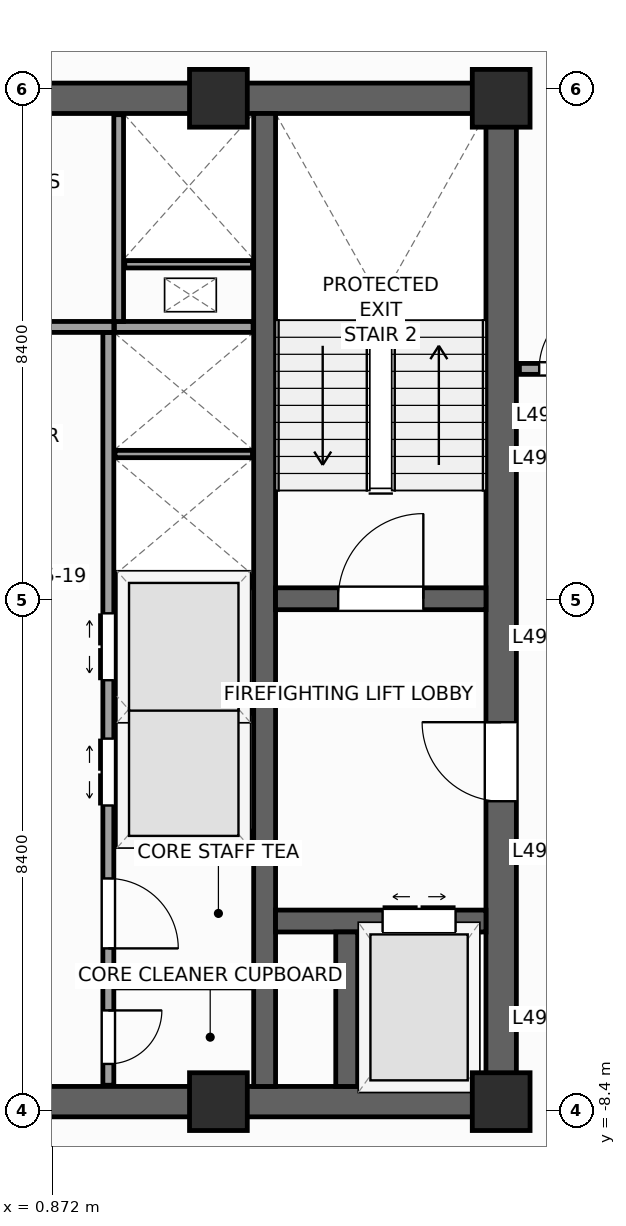
"""IFC4 building model, lengths in metres.
Left out: names, types, materials, properties, quantities, classifications, styles, units other than length and angle.
Written with IfcOpenShell. Run it as: python <this file> out.ifc"""

import sys

from ifc_helpers import new_model, si_unit, direction, frame, frame_2d, origin, origin_2d, place, context, subcontext, project, spatial, rectangle, extrude, source, transform, mapped, element, fill, save


model = new_model("IFC4")
c1 = context("Model", 3, precision=1e-05, world=origin(), true_north=direction((0.0, 1.0)))
c2 = subcontext(c1, "Body", "Model", "MODEL_VIEW")
j1 = project(units=[si_unit("LENGTHUNIT", "METRE"), si_unit("PLANEANGLEUNIT", "RADIAN")], contexts=[c1])
p1 = place(None, origin())
s1 = spatial("IfcSite", under=j1, at=p1, CompositionType="ELEMENT")
p2 = place(p1, origin())
s2 = spatial("IfcBuilding", under=s1, at=p2, CompositionType="ELEMENT")
p3 = place(p2, frame((0.0, 0.0, 205.6)))
s3 = spatial("IfcBuildingStorey", under=s2, at=p3, CompositionType="ELEMENT", Elevation=205.6)
p4 = place(p3, frame((-8.5, -8.25, 0.0), z_axis=(0.0, 0.0, 1.0), x_axis=(1.0, 0.0, 0.0)))
e1 = element("IfcWall", 1, at=p4, inside=s3, PredefinedType="SHEAR", context=c2, shape_type="SweptSolid", body=[
    extrude(rectangle(XDim=17.0, YDim=0.5, at=frame_2d((8.5, 0.0))), origin(), (0.0, 0.0, 1.0), 3.9),
])
p5 = place(p4, frame((7.85, 0.0, 0.0)))
e2 = element("IfcOpeningElement", 2, at=p5, cuts=e1, PredefinedType="OPENING", context=c2, shape_type="SweptSolid", body=[
    extrude(rectangle(XDim=1.3, YDim=2.2, at=frame_2d((0.65, 1.1))), frame((0.0, 0.26, 0.0), z_axis=(0.0, -1.0, 0.0), x_axis=(1.0, 0.0, 0.0)), (0.0, 0.0, 1.0), 0.52),
])
p6 = place(p3, frame((-8.5, 8.25, 0.0), z_axis=(0.0, 0.0, 1.0), x_axis=(1.0, 0.0, 0.0)))
e3 = element("IfcWall", 3, at=p6, inside=s3, PredefinedType="SHEAR", context=c2, shape_type="SweptSolid", body=[
    extrude(rectangle(XDim=17.0, YDim=0.5, at=frame_2d((8.5, 0.0))), origin(), (0.0, 0.0, 1.0), 3.9),
])
p7 = place(p3, frame((8.25, -8.0, 0.0), z_axis=(0.0, 0.0, 1.0), x_axis=(0.0, 1.0, 0.0)))
e4 = element("IfcWall", 4, at=p7, inside=s3, PredefinedType="SHEAR", context=c2, shape_type="SweptSolid", body=[
    extrude(rectangle(XDim=16.0, YDim=0.5, at=frame_2d((8.0, 0.0))), origin(), (0.0, 0.0, 1.0), 3.9),
])
p8 = place(p7, frame((4.69, 0.0, 0.0)))
e5 = element("IfcOpeningElement", 5, at=p8, cuts=e4, PredefinedType="OPENING", context=c2, shape_type="SweptSolid", body=[
    extrude(rectangle(XDim=1.3, YDim=2.2, at=frame_2d((0.65, 1.1))), frame((0.0, 0.26, 0.0), z_axis=(0.0, -1.0, 0.0), x_axis=(1.0, 0.0, 0.0)), (0.0, 0.0, 1.0), 0.52),
])
p9 = place(p3, frame((4.36, -8.0, 0.0), z_axis=(0.0, 0.0, 1.0), x_axis=(0.0, 1.0, 0.0)))
e6 = element("IfcWall", 6, at=p9, inside=s3, PredefinedType="SHEAR", context=c2, shape_type="SweptSolid", body=[
    extrude(rectangle(XDim=16.0, YDim=0.36, at=frame_2d((8.0, 0.0))), origin(), (0.0, 0.0, 1.0), 3.9),
])
p10 = place(p3, frame((4.54, 0.02, 0.0), z_axis=(0.0, 0.0, 1.0), x_axis=(1.0, 0.0, 0.0)))
e7 = element("IfcWall", 7, at=p10, inside=s3, PredefinedType="SHEAR", context=c2, shape_type="SweptSolid", body=[
    extrude(rectangle(XDim=3.46, YDim=0.36, at=frame_2d((1.73, 0.0))), origin(), (0.0, 0.0, 1.0), 3.9),
])
p11 = place(p10, frame((1.03, 0.0, 0.0)))
e8 = element("IfcOpeningElement", 8, at=p11, cuts=e7, PredefinedType="OPENING", context=c2, shape_type="SweptSolid", body=[
    extrude(rectangle(XDim=1.4, YDim=2.2, at=frame_2d((0.7, 1.1))), frame((0.0, 0.19, 0.0), z_axis=(0.0, -1.0, 0.0), x_axis=(1.0, 0.0, 0.0)), (0.0, 0.0, 1.0), 0.38),
])
p12 = place(p3, frame((4.54, -5.28, 0.0), z_axis=(0.0, 0.0, 1.0), x_axis=(1.0, 0.0, 0.0)))
e9 = element("IfcWall", 9, at=p12, inside=s3, PredefinedType="SHEAR", context=c2, shape_type="SweptSolid", body=[
    extrude(rectangle(XDim=3.46, YDim=0.36, at=frame_2d((1.73, 0.0))), origin(), (0.0, 0.0, 1.0), 3.9),
])
p13 = place(p12, frame((1.76, 0.0, 0.0)))
e10 = element("IfcOpeningElement", 10, at=p13, cuts=e9, PredefinedType="OPENING", context=c2, shape_type="SweptSolid", body=[
    extrude(rectangle(XDim=1.2, YDim=2.25, at=frame_2d((0.6, 1.125))), frame((0.0, 0.19, 0.0), z_axis=(0.0, -1.0, 0.0), x_axis=(1.0, 0.0, 0.0)), (0.0, 0.0, 1.0), 0.38),
])
p14 = place(p3, frame((5.71, -8.0, 0.0), z_axis=(0.0, 0.0, 1.0), x_axis=(0.0, 1.0, 0.0)))
e11 = element("IfcWall", 11, at=p14, inside=s3, PredefinedType="SHEAR", context=c2, shape_type="SweptSolid", body=[
    extrude(rectangle(XDim=2.54, YDim=0.36, at=frame_2d((1.27, 0.0))), origin(), (0.0, 0.0, 1.0), 3.9),
])
m1 = source(origin(), c2, "Body", "SweptSolid", [
    extrude(rectangle(XDim=0.95, YDim=0.95, at=origin_2d()), origin(), (0.0, 0.0, 1.0), 3.9),
])
for number, where, z_axis, x_axis in (
    (12, (8.25, -8.25, 0.0), (0.0, 0.0, 1.0), (1.0, 0.0, 0.0)),
    (13, (8.25, 8.25, 0.0), (0.0, 0.0, 1.0), (1.0, 0.0, 0.0)),
    (14, (3.6, -8.25, 0.0), (0.0, 0.0, 1.0), (1.0, 0.0, 0.0)),
    (15, (3.6, 8.25, 0.0), (0.0, 0.0, 1.0), (1.0, 0.0, 0.0)),
):
    element("IfcColumn", number, at=place(p3, frame(where, z_axis=z_axis, x_axis=x_axis)), inside=s3, PredefinedType="PILASTER", context=c2, shape_type="MappedRepresentation", body=[
        mapped(m1, transform((0.0, 0.0, 0.0), scale=1.0)),
    ])
p15 = place(p3, frame((6.733, -29.154, 0.0), z_axis=(0.0, 0.0, 1.0), x_axis=(0.629325378072, 0.77714192302, 0.0)))
e16 = element("IfcWall", 16, at=p15, inside=s3, PredefinedType="STANDARD", context=c2, shape_type="SweptSolid", body=[
    extrude(rectangle(XDim=36.84, YDim=0.34, at=frame_2d((18.42, 0.0))), origin(), (0.0, 0.0, 1.0), 2.96),
])
p16 = place(p15, frame((3.721, 0.0, 0.48)))
e17 = element("IfcOpeningElement", 17, at=p16, cuts=e16, PredefinedType="OPENING", context=c2, shape_type="SweptSolid", body=[
    extrude(rectangle(XDim=1.4, YDim=2.4, at=frame_2d((0.7, 1.2))), frame((0.0, 0.18, 0.0), z_axis=(0.0, -1.0, 0.0), x_axis=(1.0, 0.0, 0.0)), (0.0, 0.0, 1.0), 0.36),
])
p17 = place(p15, frame((10.559, 0.0, 0.58)))
e18 = element("IfcOpeningElement", 18, at=p17, cuts=e16, PredefinedType="OPENING", context=c2, shape_type="SweptSolid", body=[
    extrude(rectangle(XDim=1.75, YDim=2.3, at=frame_2d((0.875, 1.15))), frame((0.0, 0.18, 0.0), z_axis=(0.0, -1.0, 0.0), x_axis=(1.0, 0.0, 0.0)), (0.0, 0.0, 1.0), 0.36),
])
p18 = place(p15, frame((16.058, 0.0, 0.58)))
e19 = element("IfcOpeningElement", 19, at=p18, cuts=e16, PredefinedType="OPENING", context=c2, shape_type="SweptSolid", body=[
    extrude(rectangle(XDim=1.75, YDim=2.3, at=frame_2d((0.875, 1.15))), frame((0.0, 0.18, 0.0), z_axis=(0.0, -1.0, 0.0), x_axis=(1.0, 0.0, 0.0)), (0.0, 0.0, 1.0), 0.36),
])
p19 = place(p15, frame((24.176, 0.0, 0.58)))
e20 = element("IfcOpeningElement", 20, at=p19, cuts=e16, PredefinedType="OPENING", context=c2, shape_type="SweptSolid", body=[
    extrude(rectangle(XDim=1.75, YDim=2.3, at=frame_2d((0.875, 1.15))), frame((0.0, 0.18, 0.0), z_axis=(0.0, -1.0, 0.0), x_axis=(1.0, 0.0, 0.0)), (0.0, 0.0, 1.0), 0.36),
])
p20 = place(p15, frame((30.982, 0.0, 0.48)))
e21 = element("IfcOpeningElement", 21, at=p20, cuts=e16, PredefinedType="OPENING", context=c2, shape_type="SweptSolid", body=[
    extrude(rectangle(XDim=1.4, YDim=2.4, at=frame_2d((0.7, 1.2))), frame((0.0, 0.18, 0.0), z_axis=(0.0, -1.0, 0.0), x_axis=(1.0, 0.0, 0.0)), (0.0, 0.0, 1.0), 0.36),
])
p21 = place(p3, frame((29.154, 6.733, 0.0), z_axis=(0.0, 0.0, 1.0), x_axis=(-0.77714192302, 0.629325378072, 0.0)))
e22 = element("IfcWall", 22, at=p21, inside=s3, PredefinedType="STANDARD", context=c2, shape_type="SweptSolid", body=[
    extrude(rectangle(XDim=36.84, YDim=0.34, at=frame_2d((18.42, 0.0))), origin(), (0.0, 0.0, 1.0), 2.96),
])
p22 = place(p21, frame((23.495, 0.0, 0.0)))
e23 = element("IfcOpeningElement", 23, at=p22, cuts=e22, PredefinedType="OPENING", context=c2, shape_type="SweptSolid", body=[
    extrude(rectangle(XDim=1.05, YDim=2.25, at=frame_2d((0.525, 1.125))), frame((0.0, 0.18, 0.0), z_axis=(0.0, -1.0, 0.0), x_axis=(1.0, 0.0, 0.0)), (0.0, 0.0, 1.0), 0.36),
])
p23 = place(p21, frame((3.721, 0.0, 0.48)))
e24 = element("IfcOpeningElement", 24, at=p23, cuts=e22, PredefinedType="OPENING", context=c2, shape_type="SweptSolid", body=[
    extrude(rectangle(XDim=1.4, YDim=2.4, at=frame_2d((0.7, 1.2))), frame((0.0, 0.18, 0.0), z_axis=(0.0, -1.0, 0.0), x_axis=(1.0, 0.0, 0.0)), (0.0, 0.0, 1.0), 0.36),
])
p24 = place(p21, frame((9.809, 0.0, 0.58)))
e25 = element("IfcOpeningElement", 25, at=p24, cuts=e22, PredefinedType="OPENING", context=c2, shape_type="SweptSolid", body=[
    extrude(rectangle(XDim=1.75, YDim=2.3, at=frame_2d((0.875, 1.15))), frame((0.0, 0.18, 0.0), z_axis=(0.0, -1.0, 0.0), x_axis=(1.0, 0.0, 0.0)), (0.0, 0.0, 1.0), 0.36),
])
p25 = place(p21, frame((16.058, 0.0, 0.58)))
e26 = element("IfcOpeningElement", 26, at=p25, cuts=e22, PredefinedType="OPENING", context=c2, shape_type="SweptSolid", body=[
    extrude(rectangle(XDim=1.75, YDim=2.3, at=frame_2d((0.875, 1.15))), frame((0.0, 0.18, 0.0), z_axis=(0.0, -1.0, 0.0), x_axis=(1.0, 0.0, 0.0)), (0.0, 0.0, 1.0), 0.36),
])
p26 = place(p21, frame((25.676, 0.0, 0.58)))
e27 = element("IfcOpeningElement", 27, at=p26, cuts=e22, PredefinedType="OPENING", context=c2, shape_type="SweptSolid", body=[
    extrude(rectangle(XDim=1.75, YDim=2.3, at=frame_2d((0.875, 1.15))), frame((0.0, 0.18, 0.0), z_axis=(0.0, -1.0, 0.0), x_axis=(1.0, 0.0, 0.0)), (0.0, 0.0, 1.0), 0.36),
])
p27 = place(p21, frame((30.982, 0.0, 0.48)))
e28 = element("IfcOpeningElement", 28, at=p27, cuts=e22, PredefinedType="OPENING", context=c2, shape_type="SweptSolid", body=[
    extrude(rectangle(XDim=1.4, YDim=2.4, at=frame_2d((0.7, 1.2))), frame((0.0, 0.18, 0.0), z_axis=(0.0, -1.0, 0.0), x_axis=(1.0, 0.0, 0.0)), (0.0, 0.0, 1.0), 0.36),
])
p28 = place(p3, frame((1.79, -7.98, 0.0), z_axis=(0.0, 0.0, 1.0), x_axis=(0.0, 1.0, 0.0)))
e29 = element("IfcWall", 29, at=p28, inside=s3, PredefinedType="PARTITIONING", context=c2, shape_type="SweptSolid", body=[
    extrude(rectangle(XDim=12.38, YDim=0.18, at=frame_2d((6.19, 0.0))), origin(), (0.0, 0.0, 1.0), 3.66),
])
p29 = place(p28, frame((4.6, 0.0, 0.0)))
e30 = element("IfcOpeningElement", 30, at=p29, cuts=e29, PredefinedType="OPENING", context=c2, shape_type="SweptSolid", body=[
    extrude(rectangle(XDim=1.1, YDim=2.2, at=frame_2d((0.55, 1.1))), frame((0.0, 0.1, 0.0), z_axis=(0.0, -1.0, 0.0), x_axis=(1.0, 0.0, 0.0)), (0.0, 0.0, 1.0), 0.2),
])
p30 = place(p28, frame((6.66, 0.0, 0.0)))
e31 = element("IfcOpeningElement", 31, at=p30, cuts=e29, PredefinedType="OPENING", context=c2, shape_type="SweptSolid", body=[
    extrude(rectangle(XDim=1.1, YDim=2.2, at=frame_2d((0.55, 1.1))), frame((0.0, 0.1, 0.0), z_axis=(0.0, -1.0, 0.0), x_axis=(1.0, 0.0, 0.0)), (0.0, 0.0, 1.0), 0.2),
])
p31 = place(p28, frame((0.35, 0.0, 0.0)))
e32 = element("IfcOpeningElement", 32, at=p31, cuts=e29, PredefinedType="OPENING", context=c2, shape_type="SweptSolid", body=[
    extrude(rectangle(XDim=0.88, YDim=2.1, at=frame_2d((0.44, 1.05))), frame((0.0, 0.1, 0.0), z_axis=(0.0, -1.0, 0.0), x_axis=(1.0, 0.0, 0.0)), (0.0, 0.0, 1.0), 0.2),
])
p32 = place(p28, frame((2.25, 0.0, 0.0)))
e33 = element("IfcOpeningElement", 33, at=p32, cuts=e29, PredefinedType="OPENING", context=c2, shape_type="SweptSolid", body=[
    extrude(rectangle(XDim=1.15, YDim=2.25, at=frame_2d((0.575, 1.125))), frame((0.0, 0.1, 0.0), z_axis=(0.0, -1.0, 0.0), x_axis=(1.0, 0.0, 0.0)), (0.0, 0.0, 1.0), 0.2),
])
p33 = place(p3, frame((-1.88, 4.49, 0.0), z_axis=(0.0, 0.0, 1.0), x_axis=(1.0, 0.0, 0.0)))
e34 = element("IfcWall", 34, at=p33, inside=s3, PredefinedType="PARTITIONING", context=c2, shape_type="SweptSolid", body=[
    extrude(rectangle(XDim=3.76, YDim=0.18, at=frame_2d((1.88, 0.0))), origin(), (0.0, 0.0, 1.0), 3.66),
])
p34 = place(p33, frame((1.305, 0.0, 0.0)))
e35 = element("IfcOpeningElement", 35, at=p34, cuts=e34, PredefinedType="OPENING", context=c2, shape_type="SweptSolid", body=[
    extrude(rectangle(XDim=1.15, YDim=2.25, at=frame_2d((0.575, 1.125))), frame((0.0, 0.1, 0.0), z_axis=(0.0, -1.0, 0.0), x_axis=(1.0, 0.0, 0.0)), (0.0, 0.0, 1.0), 0.2),
])
for number, where, z_axis, x_axis in (
    (36, (1.89, -3.9, 0.0), (0.0, 0.0, 1.0), (1.0, 0.0, 0.0)),
    (37, (1.89, 0.3, 0.0), (0.0, 0.0, 1.0), (1.0, 0.0, 0.0)),
    (38, (1.89, 4.49, 0.0), (0.0, 0.0, 1.0), (1.0, 0.0, 0.0)),
):
    element("IfcWall", number, at=place(p3, frame(where, z_axis=z_axis, x_axis=x_axis)), inside=s3, PredefinedType="PARTITIONING", context=c2, shape_type="SweptSolid", body=[
        extrude(rectangle(XDim=2.28, YDim=0.18, at=frame_2d((1.14, 0.0))), origin(), (0.0, 0.0, 1.0), 3.66),
    ])
for number, where, z_axis, x_axis in (
    (39, (1.9, -1.8, 0.0), (0.0, 0.0, 1.0), (1.0, 0.0, 0.0)),
    (40, (1.9, 2.4, 0.0), (0.0, 0.0, 1.0), (1.0, 0.0, 0.0)),
):
    element("IfcWall", number, at=place(p3, frame(where, z_axis=z_axis, x_axis=x_axis)), inside=s3, PredefinedType="PARTITIONING", context=c2, shape_type="SweptSolid", body=[
        extrude(rectangle(XDim=2.26, YDim=0.12, at=frame_2d((1.13, 0.0))), origin(), (0.0, 0.0, 1.0), 3.66),
    ])
p35 = place(p3, frame((1.89, -6.3, 0.0), z_axis=(0.0, 0.0, 1.0), x_axis=(1.0, 0.0, 0.0)))
e41 = element("IfcWall", 41, at=p35, inside=s3, PredefinedType="PARTITIONING", context=c2, shape_type="SweptSolid", body=[
    extrude(rectangle(XDim=2.28, YDim=0.16, at=frame_2d((1.14, 0.0))), origin(), (0.0, 0.0, 1.0), 3.66),
])
p36 = place(p3, frame((1.96, 4.58, 0.0), z_axis=(0.0, 0.0, 1.0), x_axis=(0.0, 1.0, 0.0)))
e42 = element("IfcWall", 42, at=p36, inside=s3, PredefinedType="PARTITIONING", context=c2, shape_type="SweptSolid", body=[
    extrude(rectangle(XDim=3.4, YDim=0.16, at=frame_2d((1.7, 0.0))), origin(), (0.0, 0.0, 1.0), 3.66),
])
p37 = place(p3, frame((2.06, 5.52, 0.0), z_axis=(0.0, 0.0, 1.0), x_axis=(1.0, 0.0, 0.0)))
e43 = element("IfcWall", 43, at=p37, inside=s3, PredefinedType="PARTITIONING", context=c2, shape_type="SweptSolid", body=[
    extrude(rectangle(XDim=2.1, YDim=0.12, at=frame_2d((1.05, 0.0))), origin(), (0.0, 0.0, 1.0), 3.66),
])
p38 = place(p3, frame((8.55, 3.8, 0.0), z_axis=(0.0, 0.0, 1.0), x_axis=(1.0, 0.0, 0.0)))
e44 = element("IfcWall", 44, at=p38, inside=s3, PredefinedType="PARTITIONING", context=c2, shape_type="SweptSolid", body=[
    extrude(rectangle(XDim=1.75, YDim=0.18, at=frame_2d((0.875, 0.0))), origin(), (0.0, 0.0, 1.0), 3.66),
])
p39 = place(p38, frame((0.325, 0.0, 0.0)))
e45 = element("IfcOpeningElement", 45, at=p39, cuts=e44, PredefinedType="OPENING", context=c2, shape_type="SweptSolid", body=[
    extrude(rectangle(XDim=1.1, YDim=2.2, at=frame_2d((0.55, 1.1))), frame((0.0, 0.1, 0.0), z_axis=(0.0, -1.0, 0.0), x_axis=(1.0, 0.0, 0.0)), (0.0, 0.0, 1.0), 0.2),
])
m2 = source(origin(), c2, "Body", "SweptSolid", [
    extrude(rectangle(XDim=1.4, YDim=2.2, at=frame_2d((0.7, 1.1))), frame((0.0, 0.025, 0.0), z_axis=(0.0, -1.0, 0.0), x_axis=(1.0, 0.0, 0.0)), (0.0, 0.0, 1.0), 0.05),
])
p40 = place(p11, origin())
e46 = element("IfcDoor", 46, at=p40, inside=s3, OperationType="SINGLE_SWING_RIGHT", PredefinedType="DOOR", context=c2, shape_type="MappedRepresentation", body=[
    mapped(m2, transform((0.0, 0.0, 0.0), scale=1.0)),
])
fill(e8, e46)
m3 = source(origin(), c2, "Body", "SweptSolid", [
    extrude(rectangle(XDim=1.3, YDim=2.2, at=frame_2d((0.65, 1.1))), frame((0.0, 0.025, 0.0), z_axis=(0.0, -1.0, 0.0), x_axis=(1.0, 0.0, 0.0)), (0.0, 0.0, 1.0), 0.05),
])
p41 = place(p8, origin())
e47 = element("IfcDoor", 47, at=p41, inside=s3, OperationType="SINGLE_SWING_RIGHT", PredefinedType="DOOR", context=c2, shape_type="MappedRepresentation", body=[
    mapped(m3, transform((0.0, 0.0, 0.0), scale=1.0)),
])
fill(e5, e47)
m4 = source(origin(), c2, "Body", "SweptSolid", [
    extrude(rectangle(XDim=1.2, YDim=2.25, at=frame_2d((0.6, 1.125))), frame((0.0, 0.025, 0.0), z_axis=(0.0, -1.0, 0.0), x_axis=(1.0, 0.0, 0.0)), (0.0, 0.0, 1.0), 0.05),
])
p42 = place(p13, origin())
e48 = element("IfcDoor", 48, at=p42, inside=s3, OperationType="DOUBLE_DOOR_SLIDING", PredefinedType="DOOR", context=c2, shape_type="MappedRepresentation", body=[
    mapped(m4, transform((0.0, 0.0, 0.0), scale=1.0)),
])
fill(e10, e48)
m5 = source(origin(), c2, "Body", "SweptSolid", [
    extrude(rectangle(XDim=1.1, YDim=2.2, at=frame_2d((0.55, 1.1))), frame((0.0, 0.025, 0.0), z_axis=(0.0, -1.0, 0.0), x_axis=(1.0, 0.0, 0.0)), (0.0, 0.0, 1.0), 0.05),
])
p43 = place(p29, origin())
e49 = element("IfcDoor", 49, at=p43, inside=s3, OperationType="DOUBLE_DOOR_SLIDING", PredefinedType="DOOR", context=c2, shape_type="MappedRepresentation", body=[
    mapped(m5, transform((0.0, 0.0, 0.0), scale=1.0)),
])
fill(e30, e49)
p44 = place(p30, origin())
e50 = element("IfcDoor", 50, at=p44, inside=s3, OperationType="DOUBLE_DOOR_SLIDING", PredefinedType="DOOR", context=c2, shape_type="MappedRepresentation", body=[
    mapped(m5, transform((0.0, 0.0, 0.0), scale=1.0)),
])
fill(e31, e50)
m6 = source(origin(), c2, "Body", "SweptSolid", [
    extrude(rectangle(XDim=0.88, YDim=2.1, at=frame_2d((0.44, 1.05))), frame((0.0, 0.025, 0.0), z_axis=(0.0, -1.0, 0.0), x_axis=(1.0, 0.0, 0.0)), (0.0, 0.0, 1.0), 0.05),
])
p45 = place(p31, frame((0.88, 0.0, 0.0), z_axis=(0.0, 0.0, 1.0), x_axis=(-1.0, 0.0, 0.0)))
e51 = element("IfcDoor", 51, at=p45, inside=s3, OperationType="SINGLE_SWING_RIGHT", PredefinedType="DOOR", context=c2, shape_type="MappedRepresentation", body=[
    mapped(m6, transform((0.0, 0.0, 0.0), scale=1.0)),
])
fill(e32, e51)
m7 = source(origin(), c2, "Body", "SweptSolid", [
    extrude(rectangle(XDim=1.15, YDim=2.25, at=frame_2d((0.575, 1.125))), frame((0.0, 0.025, 0.0), z_axis=(0.0, -1.0, 0.0), x_axis=(1.0, 0.0, 0.0)), (0.0, 0.0, 1.0), 0.05),
])
p46 = place(p32, frame((1.15, 0.0, 0.0), z_axis=(0.0, 0.0, 1.0), x_axis=(-1.0, 0.0, 0.0)))
e52 = element("IfcDoor", 52, at=p46, inside=s3, OperationType="SINGLE_SWING_LEFT", PredefinedType="DOOR", context=c2, shape_type="MappedRepresentation", body=[
    mapped(m7, transform((0.0, 0.0, 0.0), scale=1.0)),
])
fill(e33, e52)
p47 = place(p39, origin())
e53 = element("IfcDoor", 53, at=p47, inside=s3, OperationType="SINGLE_SWING_RIGHT", PredefinedType="DOOR", context=c2, shape_type="MappedRepresentation", body=[
    mapped(m5, transform((0.0, 0.0, 0.0), scale=1.0)),
])
fill(e45, e53)
save(model, sys.argv[1])
